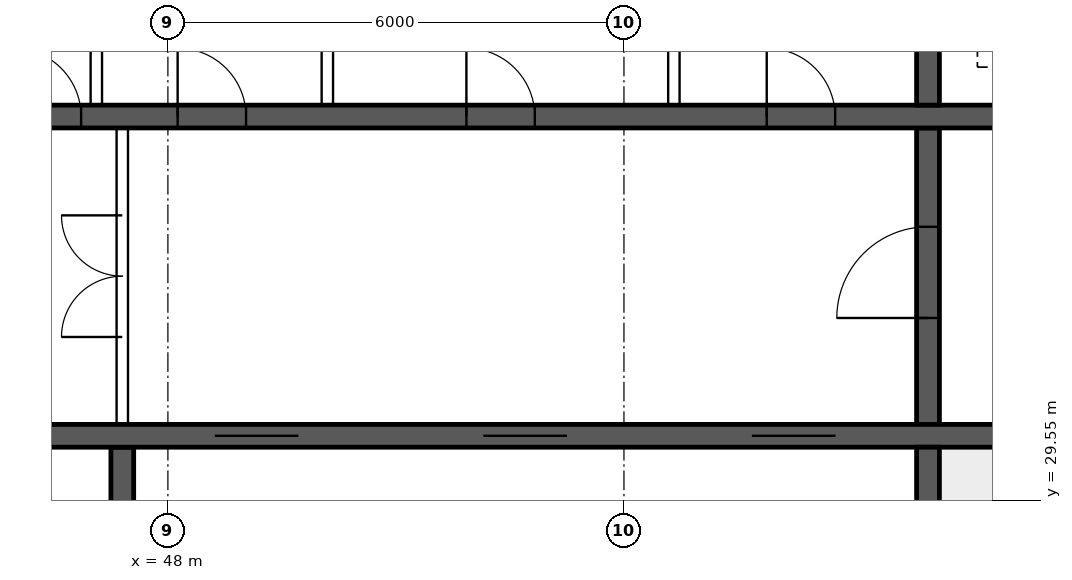
"""IFC4 building model, lengths in metres.
Left out: names, types, materials, properties, quantities, classifications, styles, units other than length and angle.
Written with IfcOpenShell. Run it as: python <this file> out.ifc"""

import sys

from ifc_helpers import new_model, si_unit, direction, frame, frame_2d, origin, place, context, subcontext, project, spatial, rectangle, extrude, element, fill, save


model = new_model("IFC4")
c1 = context("Model", 3, precision=1e-05, world=origin(), true_north=direction((0.0, 1.0)))
c2 = subcontext(c1, "Body", "Model", "MODEL_VIEW")
j1 = project(units=[si_unit("LENGTHUNIT", "METRE"), si_unit("PLANEANGLEUNIT", "RADIAN")], contexts=[c1])
p1 = place(None, origin())
s1 = spatial("IfcSite", under=j1, at=p1, CompositionType="ELEMENT")
p2 = place(p1, origin())
s2 = spatial("IfcBuilding", under=s1, at=p2, CompositionType="ELEMENT")
p3 = place(p2, frame((0.0, 0.0, 193.6)))
s3 = spatial("IfcBuildingStorey", under=s2, at=p3, CompositionType="ELEMENT", Elevation=193.6)
p4 = place(p3, frame((18.425, 30.4, 0.0), z_axis=(0.0, 0.0, 1.0), x_axis=(1.0, 0.0, 0.0)))
e1 = element("IfcWall", 1, at=p4, inside=s3, PredefinedType="SHEAR", context=c2, shape_type="SweptSolid", body=[
    extrude(rectangle(XDim=47.15, YDim=0.3, at=frame_2d((23.575, 0.0))), origin(), (0.0, 0.0, 1.0), 3.75),
])
p5 = place(p4, frame((0.4, 0.0, 0.0)))
e2 = element("IfcOpeningElement", 2, at=p5, cuts=e1, PredefinedType="OPENING", context=c2, shape_type="SweptSolid", body=[
    extrude(rectangle(XDim=1.0, YDim=2.1, at=frame_2d((0.5, 1.05))), frame((0.0, 0.16, 0.0), z_axis=(0.0, -1.0, 0.0), x_axis=(1.0, 0.0, 0.0)), (0.0, 0.0, 1.0), 0.32),
])
p6 = place(p4, frame((45.75, 0.0, 0.0)))
e3 = element("IfcOpeningElement", 3, at=p6, cuts=e1, PredefinedType="OPENING", context=c2, shape_type="SweptSolid", body=[
    extrude(rectangle(XDim=1.0, YDim=2.1, at=frame_2d((0.5, 1.05))), frame((0.0, 0.16, 0.0), z_axis=(0.0, -1.0, 0.0), x_axis=(1.0, 0.0, 0.0)), (0.0, 0.0, 1.0), 0.32),
])
p7 = place(p4, frame((8.325, 0.0, 0.0)))
e4 = element("IfcOpeningElement", 4, at=p7, cuts=e1, PredefinedType="OPENING", context=c2, shape_type="SweptSolid", body=[
    extrude(rectangle(XDim=1.1, YDim=2.1, at=frame_2d((0.55, 1.05))), frame((0.0, 0.16, 0.0), z_axis=(0.0, -1.0, 0.0), x_axis=(1.0, 0.0, 0.0)), (0.0, 0.0, 1.0), 0.32),
])
p8 = place(p4, frame((10.925, 0.0, 0.0)))
e5 = element("IfcOpeningElement", 5, at=p8, cuts=e1, PredefinedType="OPENING", context=c2, shape_type="SweptSolid", body=[
    extrude(rectangle(XDim=1.1, YDim=2.1, at=frame_2d((0.55, 1.05))), frame((0.0, 0.16, 0.0), z_axis=(0.0, -1.0, 0.0), x_axis=(1.0, 0.0, 0.0)), (0.0, 0.0, 1.0), 0.32),
])
p9 = place(p4, frame((13.525, 0.0, 0.0)))
e6 = element("IfcOpeningElement", 6, at=p9, cuts=e1, PredefinedType="OPENING", context=c2, shape_type="SweptSolid", body=[
    extrude(rectangle(XDim=1.1, YDim=2.1, at=frame_2d((0.55, 1.05))), frame((0.0, 0.16, 0.0), z_axis=(0.0, -1.0, 0.0), x_axis=(1.0, 0.0, 0.0)), (0.0, 0.0, 1.0), 0.32),
])
p10 = place(p4, frame((16.125, 0.0, 0.0)))
e7 = element("IfcOpeningElement", 7, at=p10, cuts=e1, PredefinedType="OPENING", context=c2, shape_type="SweptSolid", body=[
    extrude(rectangle(XDim=1.1, YDim=2.1, at=frame_2d((0.55, 1.05))), frame((0.0, 0.16, 0.0), z_axis=(0.0, -1.0, 0.0), x_axis=(1.0, 0.0, 0.0)), (0.0, 0.0, 1.0), 0.32),
])
p11 = place(p4, frame((18.9, 0.0, 0.0)))
e8 = element("IfcOpeningElement", 8, at=p11, cuts=e1, PredefinedType="OPENING", context=c2, shape_type="SweptSolid", body=[
    extrude(rectangle(XDim=0.9, YDim=2.1, at=frame_2d((0.45, 1.05))), frame((0.0, 0.16, 0.0), z_axis=(0.0, -1.0, 0.0), x_axis=(1.0, 0.0, 0.0)), (0.0, 0.0, 1.0), 0.32),
])
p12 = place(p4, frame((30.192, 0.0, 0.0)))
e9 = element("IfcOpeningElement", 9, at=p12, cuts=e1, PredefinedType="OPENING", context=c2, shape_type="SweptSolid", body=[
    extrude(rectangle(XDim=1.1, YDim=2.1, at=frame_2d((0.55, 1.05))), frame((0.0, 0.16, 0.0), z_axis=(0.0, -1.0, 0.0), x_axis=(1.0, 0.0, 0.0)), (0.0, 0.0, 1.0), 0.32),
])
p13 = place(p4, frame((33.725, 0.0, 0.0)))
e10 = element("IfcOpeningElement", 10, at=p13, cuts=e1, PredefinedType="OPENING", context=c2, shape_type="SweptSolid", body=[
    extrude(rectangle(XDim=1.1, YDim=2.1, at=frame_2d((0.55, 1.05))), frame((0.0, 0.16, 0.0), z_axis=(0.0, -1.0, 0.0), x_axis=(1.0, 0.0, 0.0)), (0.0, 0.0, 1.0), 0.32),
])
p14 = place(p4, frame((37.258, 0.0, 0.0)))
e11 = element("IfcOpeningElement", 11, at=p14, cuts=e1, PredefinedType="OPENING", context=c2, shape_type="SweptSolid", body=[
    extrude(rectangle(XDim=1.1, YDim=2.1, at=frame_2d((0.55, 1.05))), frame((0.0, 0.16, 0.0), z_axis=(0.0, -1.0, 0.0), x_axis=(1.0, 0.0, 0.0)), (0.0, 0.0, 1.0), 0.32),
])
p15 = place(p3, frame((18.425, 34.6, 0.0), z_axis=(0.0, 0.0, 1.0), x_axis=(1.0, 0.0, 0.0)))
e12 = element("IfcWall", 12, at=p15, inside=s3, PredefinedType="SHEAR", context=c2, shape_type="SweptSolid", body=[
    extrude(rectangle(XDim=47.15, YDim=0.3, at=frame_2d((23.575, 0.0))), origin(), (0.0, 0.0, 1.0), 3.75),
])
p16 = place(p15, frame((0.9, 0.0, 0.0)))
e13 = element("IfcOpeningElement", 13, at=p16, cuts=e12, PredefinedType="OPENING", context=c2, shape_type="SweptSolid", body=[
    extrude(rectangle(XDim=1.1, YDim=2.1, at=frame_2d((0.55, 1.05))), frame((0.0, 0.16, 0.0), z_axis=(0.0, -1.0, 0.0), x_axis=(1.0, 0.0, 0.0)), (0.0, 0.0, 1.0), 0.32),
])
p17 = place(p15, frame((45.15, 0.0, 0.0)))
e14 = element("IfcOpeningElement", 14, at=p17, cuts=e12, PredefinedType="OPENING", context=c2, shape_type="SweptSolid", body=[
    extrude(rectangle(XDim=1.1, YDim=2.1, at=frame_2d((0.55, 1.05))), frame((0.0, 0.16, 0.0), z_axis=(0.0, -1.0, 0.0), x_axis=(1.0, 0.0, 0.0)), (0.0, 0.0, 1.0), 0.32),
])
p18 = place(p15, frame((4.175, 0.0, 0.0)))
e15 = element("IfcOpeningElement", 15, at=p18, cuts=e12, PredefinedType="OPENING", context=c2, shape_type="SweptSolid", body=[
    extrude(rectangle(XDim=0.9, YDim=2.1, at=frame_2d((0.45, 1.05))), frame((0.0, 0.16, 0.0), z_axis=(0.0, -1.0, 0.0), x_axis=(1.0, 0.0, 0.0)), (0.0, 0.0, 1.0), 0.32),
])
p19 = place(p15, frame((42.075, 0.0, 0.0)))
e16 = element("IfcOpeningElement", 16, at=p19, cuts=e12, PredefinedType="OPENING", context=c2, shape_type="SweptSolid", body=[
    extrude(rectangle(XDim=0.9, YDim=2.1, at=frame_2d((0.45, 1.05))), frame((0.0, 0.16, 0.0), z_axis=(0.0, -1.0, 0.0), x_axis=(1.0, 0.0, 0.0)), (0.0, 0.0, 1.0), 0.32),
])
p20 = place(p15, frame((8.95, 0.0, 0.0)))
e17 = element("IfcOpeningElement", 17, at=p20, cuts=e12, PredefinedType="OPENING", context=c2, shape_type="SweptSolid", body=[
    extrude(rectangle(XDim=0.9, YDim=2.1, at=frame_2d((0.45, 1.05))), frame((0.0, 0.16, 0.0), z_axis=(0.0, -1.0, 0.0), x_axis=(1.0, 0.0, 0.0)), (0.0, 0.0, 1.0), 0.32),
])
p21 = place(p15, frame((12.924, 0.0, 0.0)))
e18 = element("IfcOpeningElement", 18, at=p21, cuts=e12, PredefinedType="OPENING", context=c2, shape_type="SweptSolid", body=[
    extrude(rectangle(XDim=0.9, YDim=2.1, at=frame_2d((0.45, 1.05))), frame((0.0, 0.16, 0.0), z_axis=(0.0, -1.0, 0.0), x_axis=(1.0, 0.0, 0.0)), (0.0, 0.0, 1.0), 0.32),
])
p22 = place(p15, frame((16.571, 0.0, 0.0)))
e19 = element("IfcOpeningElement", 19, at=p22, cuts=e12, PredefinedType="OPENING", context=c2, shape_type="SweptSolid", body=[
    extrude(rectangle(XDim=0.9, YDim=2.1, at=frame_2d((0.45, 1.05))), frame((0.0, 0.16, 0.0), z_axis=(0.0, -1.0, 0.0), x_axis=(1.0, 0.0, 0.0)), (0.0, 0.0, 1.0), 0.32),
])
p23 = place(p15, frame((20.33, 0.0, 0.0)))
e20 = element("IfcOpeningElement", 20, at=p23, cuts=e12, PredefinedType="OPENING", context=c2, shape_type="SweptSolid", body=[
    extrude(rectangle(XDim=0.9, YDim=2.1, at=frame_2d((0.45, 1.05))), frame((0.0, 0.16, 0.0), z_axis=(0.0, -1.0, 0.0), x_axis=(1.0, 0.0, 0.0)), (0.0, 0.0, 1.0), 0.32),
])
p24 = place(p15, frame((24.736, 0.0, 0.0)))
e21 = element("IfcOpeningElement", 21, at=p24, cuts=e12, PredefinedType="OPENING", context=c2, shape_type="SweptSolid", body=[
    extrude(rectangle(XDim=0.9, YDim=2.1, at=frame_2d((0.45, 1.05))), frame((0.0, 0.16, 0.0), z_axis=(0.0, -1.0, 0.0), x_axis=(1.0, 0.0, 0.0)), (0.0, 0.0, 1.0), 0.32),
])
p25 = place(p15, frame((27.533, 0.0, 0.0)))
e22 = element("IfcOpeningElement", 22, at=p25, cuts=e12, PredefinedType="OPENING", context=c2, shape_type="SweptSolid", body=[
    extrude(rectangle(XDim=0.9, YDim=2.1, at=frame_2d((0.45, 1.05))), frame((0.0, 0.16, 0.0), z_axis=(0.0, -1.0, 0.0), x_axis=(1.0, 0.0, 0.0)), (0.0, 0.0, 1.0), 0.32),
])
p26 = place(p15, frame((29.703, 0.0, 0.0)))
e23 = element("IfcOpeningElement", 23, at=p26, cuts=e12, PredefinedType="OPENING", context=c2, shape_type="SweptSolid", body=[
    extrude(rectangle(XDim=0.9, YDim=2.1, at=frame_2d((0.45, 1.05))), frame((0.0, 0.16, 0.0), z_axis=(0.0, -1.0, 0.0), x_axis=(1.0, 0.0, 0.0)), (0.0, 0.0, 1.0), 0.32),
])
p27 = place(p15, frame((33.502, 0.0, 0.0)))
e24 = element("IfcOpeningElement", 24, at=p27, cuts=e12, PredefinedType="OPENING", context=c2, shape_type="SweptSolid", body=[
    extrude(rectangle(XDim=0.9, YDim=2.1, at=frame_2d((0.45, 1.05))), frame((0.0, 0.16, 0.0), z_axis=(0.0, -1.0, 0.0), x_axis=(1.0, 0.0, 0.0)), (0.0, 0.0, 1.0), 0.32),
])
p28 = place(p15, frame((37.453, 0.0, 0.0)))
e25 = element("IfcOpeningElement", 25, at=p28, cuts=e12, PredefinedType="OPENING", context=c2, shape_type="SweptSolid", body=[
    extrude(rectangle(XDim=0.9, YDim=2.1, at=frame_2d((0.45, 1.05))), frame((0.0, 0.16, 0.0), z_axis=(0.0, -1.0, 0.0), x_axis=(1.0, 0.0, 0.0)), (0.0, 0.0, 1.0), 0.32),
])
p29 = place(p3, frame((58.0, 26.225, 0.0), z_axis=(0.0, 0.0, 1.0), x_axis=(0.0, 1.0, 0.0)))
e26 = element("IfcWall", 26, at=p29, inside=s3, PredefinedType="SHEAR", context=c2, shape_type="SweptSolid", body=[
    extrude(rectangle(XDim=4.025, YDim=0.3, at=frame_2d((2.012, 0.0))), origin(), (0.0, 0.0, 1.0), 3.75),
])
p30 = place(p3, frame((58.0, 30.55, 0.0), z_axis=(0.0, 0.0, 1.0), x_axis=(0.0, 1.0, 0.0)))
e27 = element("IfcWall", 27, at=p30, inside=s3, PredefinedType="SHEAR", context=c2, shape_type="SweptSolid", body=[
    extrude(rectangle(XDim=3.9, YDim=0.3, at=frame_2d((1.95, 0.0))), origin(), (0.0, 0.0, 1.0), 3.75),
])
p31 = place(p30, frame((1.4, 0.0, 0.0)))
e28 = element("IfcOpeningElement", 28, at=p31, cuts=e27, PredefinedType="OPENING", context=c2, shape_type="SweptSolid", body=[
    extrude(rectangle(XDim=1.2, YDim=2.1, at=frame_2d((0.6, 1.05))), frame((0.0, 0.16, 0.0), z_axis=(0.0, -1.0, 0.0), x_axis=(1.0, 0.0, 0.0)), (0.0, 0.0, 1.0), 0.32),
])
p32 = place(p3, frame((58.0, 34.75, 0.0), z_axis=(0.0, 0.0, 1.0), x_axis=(0.0, 1.0, 0.0)))
e29 = element("IfcWall", 29, at=p32, inside=s3, PredefinedType="SHEAR", context=c2, shape_type="SweptSolid", body=[
    extrude(rectangle(XDim=3.025, YDim=0.3, at=frame_2d((1.512, 0.0))), origin(), (0.0, 0.0, 1.0), 3.75),
])
p33 = place(p3, frame((47.4, 26.225, 0.0), z_axis=(0.0, 0.0, 1.0), x_axis=(0.0, 1.0, 0.0)))
e30 = element("IfcWall", 30, at=p33, inside=s3, PredefinedType="SHEAR", context=c2, shape_type="SweptSolid", body=[
    extrude(rectangle(XDim=4.025, YDim=0.3, at=frame_2d((2.012, 0.0))), origin(), (0.0, 0.0, 1.0), 3.75),
])
p34 = place(p3, frame((47.4, 30.55, 0.0), z_axis=(0.0, 0.0, 1.0), x_axis=(0.0, 1.0, 0.0)))
e31 = element("IfcWall", 31, at=p34, inside=s3, PredefinedType="SOLIDWALL", context=c2, shape_type="SweptSolid", body=[
    extrude(rectangle(XDim=3.9, YDim=0.15, at=frame_2d((1.95, 0.0))), origin(), (0.0, 0.0, 1.0), 3.5),
])
p35 = place(p34, frame((1.15, 0.0, 0.0)))
e32 = element("IfcOpeningElement", 32, at=p35, cuts=e31, PredefinedType="OPENING", context=c2, shape_type="SweptSolid", body=[
    extrude(rectangle(XDim=1.6, YDim=2.1, at=frame_2d((0.8, 1.05))), frame((0.0, 0.085, 0.0), z_axis=(0.0, -1.0, 0.0), x_axis=(1.0, 0.0, 0.0)), (0.0, 0.0, 1.0), 0.17),
])
for number, where, z_axis, x_axis in (
    (33, (47.058, 34.75, 0.0), (0.0, 0.0, 1.0), (0.0, 1.0, 0.0)),
    (34, (50.098, 34.75, 0.0), (0.0, 0.0, 1.0), (0.0, 1.0, 0.0)),
    (35, (54.657, 34.75, 0.0), (0.0, 0.0, 1.0), (0.0, 1.0, 0.0)),
):
    element("IfcWall", number, at=place(p3, frame(where, z_axis=z_axis, x_axis=x_axis)), inside=s3, PredefinedType="SOLIDWALL", context=c2, shape_type="SweptSolid", body=[
        extrude(rectangle(XDim=3.025, YDim=0.15, at=frame_2d((1.512, 0.0))), origin(), (0.0, 0.0, 1.0), 3.5),
    ])
p36 = place(p35, origin())
e36 = element("IfcDoor", 36, at=p36, inside=s3, OperationType="DOUBLE_DOOR_SINGLE_SWING", PredefinedType="DOOR", context=c2, shape_type="SweptSolid", body=[
    extrude(rectangle(XDim=1.6, YDim=2.1, at=frame_2d((0.8, 1.05))), frame((0.0, 0.025, 0.0), z_axis=(0.0, -1.0, 0.0), x_axis=(1.0, 0.0, 0.0)), (0.0, 0.0, 1.0), 0.05),
])
fill(e32, e36)
p37 = place(p31, origin())
e37 = element("IfcDoor", 37, at=p37, inside=s3, OperationType="SINGLE_SWING_LEFT", PredefinedType="DOOR", context=c2, shape_type="SweptSolid", body=[
    extrude(rectangle(XDim=1.2, YDim=2.1, at=frame_2d((0.6, 1.05))), frame((0.0, 0.025, 0.0), z_axis=(0.0, -1.0, 0.0), x_axis=(1.0, 0.0, 0.0)), (0.0, 0.0, 1.0), 0.05),
])
fill(e28, e37)
p38 = place(p25, origin())
e38 = element("IfcDoor", 38, at=p38, inside=s3, OperationType="SINGLE_SWING_LEFT", PredefinedType="DOOR", context=c2, shape_type="SweptSolid", body=[
    extrude(rectangle(XDim=0.9, YDim=2.1, at=frame_2d((0.45, 1.05))), frame((0.0, 0.025, 0.0), z_axis=(0.0, -1.0, 0.0), x_axis=(1.0, 0.0, 0.0)), (0.0, 0.0, 1.0), 0.05),
])
fill(e22, e38)
p39 = place(p26, origin())
e39 = element("IfcDoor", 39, at=p39, inside=s3, OperationType="SINGLE_SWING_LEFT", PredefinedType="DOOR", context=c2, shape_type="SweptSolid", body=[
    extrude(rectangle(XDim=0.9, YDim=2.1, at=frame_2d((0.45, 1.05))), frame((0.0, 0.025, 0.0), z_axis=(0.0, -1.0, 0.0), x_axis=(1.0, 0.0, 0.0)), (0.0, 0.0, 1.0), 0.05),
])
fill(e23, e39)
p40 = place(p27, origin())
e40 = element("IfcDoor", 40, at=p40, inside=s3, OperationType="SINGLE_SWING_LEFT", PredefinedType="DOOR", context=c2, shape_type="SweptSolid", body=[
    extrude(rectangle(XDim=0.9, YDim=2.1, at=frame_2d((0.45, 1.05))), frame((0.0, 0.025, 0.0), z_axis=(0.0, -1.0, 0.0), x_axis=(1.0, 0.0, 0.0)), (0.0, 0.0, 1.0), 0.05),
])
fill(e24, e40)
p41 = place(p28, origin())
e41 = element("IfcDoor", 41, at=p41, inside=s3, OperationType="SINGLE_SWING_LEFT", PredefinedType="DOOR", context=c2, shape_type="SweptSolid", body=[
    extrude(rectangle(XDim=0.9, YDim=2.1, at=frame_2d((0.45, 1.05))), frame((0.0, 0.025, 0.0), z_axis=(0.0, -1.0, 0.0), x_axis=(1.0, 0.0, 0.0)), (0.0, 0.0, 1.0), 0.05),
])
fill(e25, e41)
p42 = place(p12, origin())
e42 = element("IfcDoor", 42, at=p42, inside=s3, OperationType="DOUBLE_DOOR_SLIDING", PredefinedType="DOOR", context=c2, shape_type="SweptSolid", body=[
    extrude(rectangle(XDim=1.1, YDim=2.1, at=frame_2d((0.55, 1.05))), frame((0.0, 0.025, 0.0), z_axis=(0.0, -1.0, 0.0), x_axis=(1.0, 0.0, 0.0)), (0.0, 0.0, 1.0), 0.05),
])
fill(e9, e42)
p43 = place(p13, origin())
e43 = element("IfcDoor", 43, at=p43, inside=s3, OperationType="DOUBLE_DOOR_SLIDING", PredefinedType="DOOR", context=c2, shape_type="SweptSolid", body=[
    extrude(rectangle(XDim=1.1, YDim=2.1, at=frame_2d((0.55, 1.05))), frame((0.0, 0.025, 0.0), z_axis=(0.0, -1.0, 0.0), x_axis=(1.0, 0.0, 0.0)), (0.0, 0.0, 1.0), 0.05),
])
fill(e10, e43)
p44 = place(p14, origin())
e44 = element("IfcDoor", 44, at=p44, inside=s3, OperationType="DOUBLE_DOOR_SLIDING", PredefinedType="DOOR", context=c2, shape_type="SweptSolid", body=[
    extrude(rectangle(XDim=1.1, YDim=2.1, at=frame_2d((0.55, 1.05))), frame((0.0, 0.025, 0.0), z_axis=(0.0, -1.0, 0.0), x_axis=(1.0, 0.0, 0.0)), (0.0, 0.0, 1.0), 0.05),
])
fill(e11, e44)
save(model, sys.argv[1])
